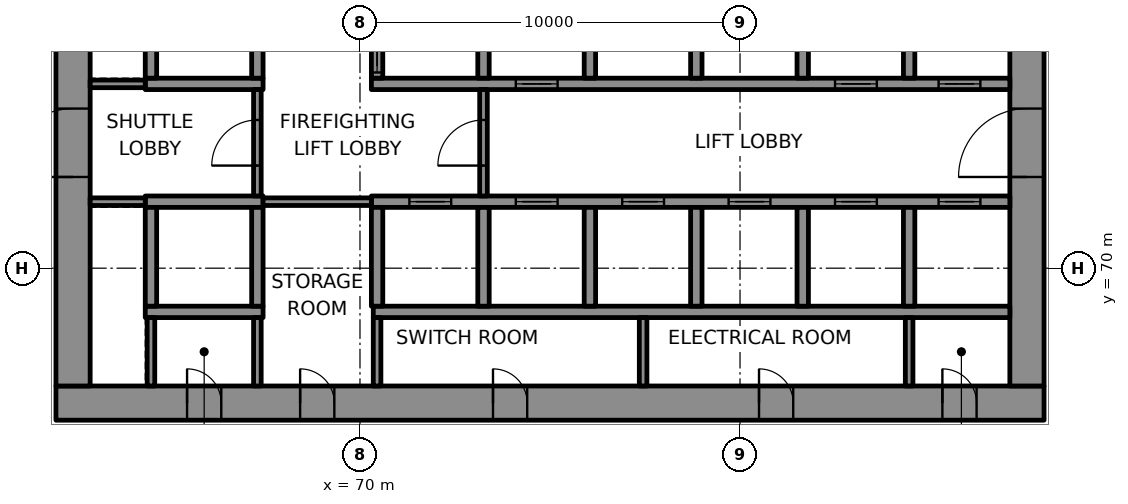
"""IFC4 building model, lengths in metres.
Left out: names, types, materials, properties, quantities, classifications, styles, units other than length and angle.
Written with IfcOpenShell. Run it as: python <this file> out.ifc"""

import sys

from ifc_helpers import new_model, si_unit, direction, frame, frame_2d, origin, place, context, subcontext, project, spatial, rectangle, extrude, element, fill, save


model = new_model("IFC4")
c1 = context("Model", 3, precision=1e-05, world=origin(), true_north=direction((0.0, 1.0)))
c2 = subcontext(c1, "Body", "Model", "MODEL_VIEW")
j1 = project(units=[si_unit("LENGTHUNIT", "METRE"), si_unit("PLANEANGLEUNIT", "RADIAN")], contexts=[c1])
p1 = place(None, origin())
s1 = spatial("IfcSite", under=j1, at=p1, CompositionType="ELEMENT")
p2 = place(p1, origin())
s2 = spatial("IfcBuilding", under=s1, at=p2, CompositionType="ELEMENT")
p3 = place(p2, frame((0.0, 0.0, 61.0)))
s3 = spatial("IfcBuildingStorey", under=s2, at=p3, CompositionType="ELEMENT", Elevation=61.0)
p4 = place(p3, frame((62.0, 66.45, 0.0), z_axis=(0.0, 0.0, 1.0), x_axis=(1.0, 0.0, 0.0)))
e1 = element("IfcWall", 1, at=p4, inside=s3, PredefinedType="SHEAR", context=c2, shape_type="SweptSolid", body=[
    extrude(rectangle(XDim=26.0, YDim=0.9, at=frame_2d((13.0, 0.0))), origin(), (0.0, 0.0, 1.0), 4.0),
])
p5 = place(p4, frame((3.45, 0.0, 0.0)))
e2 = element("IfcOpeningElement", 2, at=p5, cuts=e1, PredefinedType="OPENING", context=c2, shape_type="SweptSolid", body=[
    extrude(rectangle(XDim=0.9, YDim=2.1, at=frame_2d((0.45, 1.05))), frame((0.0, 0.46, 0.0), z_axis=(0.0, -1.0, 0.0), x_axis=(1.0, 0.0, 0.0)), (0.0, 0.0, 1.0), 0.92),
])
p6 = place(p4, frame((6.425, 0.0, 0.0)))
e3 = element("IfcOpeningElement", 3, at=p6, cuts=e1, PredefinedType="OPENING", context=c2, shape_type="SweptSolid", body=[
    extrude(rectangle(XDim=0.9, YDim=2.1, at=frame_2d((0.45, 1.05))), frame((0.0, 0.46, 0.0), z_axis=(0.0, -1.0, 0.0), x_axis=(1.0, 0.0, 0.0)), (0.0, 0.0, 1.0), 0.92),
])
p7 = place(p4, frame((11.5, 0.0, 0.0)))
e4 = element("IfcOpeningElement", 4, at=p7, cuts=e1, PredefinedType="OPENING", context=c2, shape_type="SweptSolid", body=[
    extrude(rectangle(XDim=0.9, YDim=2.1, at=frame_2d((0.45, 1.05))), frame((0.0, 0.46, 0.0), z_axis=(0.0, -1.0, 0.0), x_axis=(1.0, 0.0, 0.0)), (0.0, 0.0, 1.0), 0.92),
])
p8 = place(p4, frame((18.5, 0.0, 0.0)))
e5 = element("IfcOpeningElement", 5, at=p8, cuts=e1, PredefinedType="OPENING", context=c2, shape_type="SweptSolid", body=[
    extrude(rectangle(XDim=0.9, YDim=2.1, at=frame_2d((0.45, 1.05))), frame((0.0, 0.46, 0.0), z_axis=(0.0, -1.0, 0.0), x_axis=(1.0, 0.0, 0.0)), (0.0, 0.0, 1.0), 0.92),
])
p9 = place(p4, frame((23.325, 0.0, 0.0)))
e6 = element("IfcOpeningElement", 6, at=p9, cuts=e1, PredefinedType="OPENING", context=c2, shape_type="SweptSolid", body=[
    extrude(rectangle(XDim=0.9, YDim=2.1, at=frame_2d((0.45, 1.05))), frame((0.0, 0.46, 0.0), z_axis=(0.0, -1.0, 0.0), x_axis=(1.0, 0.0, 0.0)), (0.0, 0.0, 1.0), 0.92),
])
p10 = place(p3, frame((62.45, 66.9, 0.0), z_axis=(0.0, 0.0, 1.0), x_axis=(0.0, 1.0, 0.0)))
e7 = element("IfcWall", 7, at=p10, inside=s3, PredefinedType="SHEAR", context=c2, shape_type="SweptSolid", body=[
    extrude(rectangle(XDim=16.2, YDim=0.9, at=frame_2d((8.1, 0.0))), origin(), (0.0, 0.0, 1.0), 4.0),
])
p11 = place(p10, frame((5.5, 0.0, 0.0)))
e8 = element("IfcOpeningElement", 8, at=p11, cuts=e7, PredefinedType="OPENING", context=c2, shape_type="SweptSolid", body=[
    extrude(rectangle(XDim=1.8, YDim=2.1, at=frame_2d((0.9, 1.05))), frame((0.0, 0.46, 0.0), z_axis=(0.0, -1.0, 0.0), x_axis=(1.0, 0.0, 0.0)), (0.0, 0.0, 1.0), 0.92),
])
p12 = place(p3, frame((87.55, 66.9, 0.0), z_axis=(0.0, 0.0, 1.0), x_axis=(0.0, 1.0, 0.0)))
e9 = element("IfcWall", 9, at=p12, inside=s3, PredefinedType="SHEAR", context=c2, shape_type="SweptSolid", body=[
    extrude(rectangle(XDim=16.2, YDim=0.9, at=frame_2d((8.1, 0.0))), origin(), (0.0, 0.0, 1.0), 4.0),
])
p13 = place(p12, frame((5.5, 0.0, 0.0)))
e10 = element("IfcOpeningElement", 10, at=p13, cuts=e9, PredefinedType="OPENING", context=c2, shape_type="SweptSolid", body=[
    extrude(rectangle(XDim=1.8, YDim=2.1, at=frame_2d((0.9, 1.05))), frame((0.0, 0.46, 0.0), z_axis=(0.0, -1.0, 0.0), x_axis=(1.0, 0.0, 0.0)), (0.0, 0.0, 1.0), 0.92),
])
p14 = place(p12, frame((12.272, 0.0, 0.0)))
e11 = element("IfcOpeningElement", 11, at=p14, cuts=e9, PredefinedType="OPENING", context=c2, shape_type="SweptSolid", body=[
    extrude(rectangle(XDim=0.9, YDim=2.1, at=frame_2d((0.45, 1.05))), frame((0.0, 0.46, 0.0), z_axis=(0.0, -1.0, 0.0), x_axis=(1.0, 0.0, 0.0)), (0.0, 0.0, 1.0), 0.92),
])
p15 = place(p3, frame((64.35, 68.85, 0.0), z_axis=(0.0, 0.0, 1.0), x_axis=(1.0, 0.0, 0.0)))
e12 = element("IfcWall", 12, at=p15, inside=s3, PredefinedType="SHEAR", context=c2, shape_type="SweptSolid", body=[
    extrude(rectangle(XDim=3.1, YDim=0.3, at=frame_2d((1.55, 0.0))), origin(), (0.0, 0.0, 1.0), 4.0),
])
p16 = place(p3, frame((70.35, 68.85, 0.0), z_axis=(0.0, 0.0, 1.0), x_axis=(1.0, 0.0, 0.0)))
e13 = element("IfcWall", 13, at=p16, inside=s3, PredefinedType="SHEAR", context=c2, shape_type="SweptSolid", body=[
    extrude(rectangle(XDim=16.75, YDim=0.3, at=frame_2d((8.375, 0.0))), origin(), (0.0, 0.0, 1.0), 4.0),
])
p17 = place(p3, frame((64.35, 71.75, 0.0), z_axis=(0.0, 0.0, 1.0), x_axis=(1.0, 0.0, 0.0)))
e14 = element("IfcWall", 14, at=p17, inside=s3, PredefinedType="SHEAR", context=c2, shape_type="SweptSolid", body=[
    extrude(rectangle(XDim=3.1, YDim=0.3, at=frame_2d((1.55, 0.0))), origin(), (0.0, 0.0, 1.0), 4.0),
])
p18 = place(p3, frame((70.3, 71.75, 0.0), z_axis=(0.0, 0.0, 1.0), x_axis=(1.0, 0.0, 0.0)))
e15 = element("IfcWall", 15, at=p18, inside=s3, PredefinedType="SHEAR", context=c2, shape_type="SweptSolid", body=[
    extrude(rectangle(XDim=16.8, YDim=0.3, at=frame_2d((8.4, 0.0))), origin(), (0.0, 0.0, 1.0), 4.0),
])
p19 = place(p18, frame((1.0, 0.0, 0.0)))
e16 = element("IfcOpeningElement", 16, at=p19, cuts=e15, PredefinedType="OPENING", context=c2, shape_type="SweptSolid", body=[
    extrude(rectangle(XDim=1.1, YDim=2.1, at=frame_2d((0.55, 1.05))), frame((0.0, 0.16, 0.0), z_axis=(0.0, -1.0, 0.0), x_axis=(1.0, 0.0, 0.0)), (0.0, 0.0, 1.0), 0.32),
])
p20 = place(p18, frame((3.8, 0.0, 0.0)))
e17 = element("IfcOpeningElement", 17, at=p20, cuts=e15, PredefinedType="OPENING", context=c2, shape_type="SweptSolid", body=[
    extrude(rectangle(XDim=1.1, YDim=2.1, at=frame_2d((0.55, 1.05))), frame((0.0, 0.16, 0.0), z_axis=(0.0, -1.0, 0.0), x_axis=(1.0, 0.0, 0.0)), (0.0, 0.0, 1.0), 0.32),
])
p21 = place(p18, frame((6.6, 0.0, 0.0)))
e18 = element("IfcOpeningElement", 18, at=p21, cuts=e15, PredefinedType="OPENING", context=c2, shape_type="SweptSolid", body=[
    extrude(rectangle(XDim=1.1, YDim=2.1, at=frame_2d((0.55, 1.05))), frame((0.0, 0.16, 0.0), z_axis=(0.0, -1.0, 0.0), x_axis=(1.0, 0.0, 0.0)), (0.0, 0.0, 1.0), 0.32),
])
p22 = place(p18, frame((9.4, 0.0, 0.0)))
e19 = element("IfcOpeningElement", 19, at=p22, cuts=e15, PredefinedType="OPENING", context=c2, shape_type="SweptSolid", body=[
    extrude(rectangle(XDim=1.1, YDim=2.1, at=frame_2d((0.55, 1.05))), frame((0.0, 0.16, 0.0), z_axis=(0.0, -1.0, 0.0), x_axis=(1.0, 0.0, 0.0)), (0.0, 0.0, 1.0), 0.32),
])
p23 = place(p18, frame((12.2, 0.0, 0.0)))
e20 = element("IfcOpeningElement", 20, at=p23, cuts=e15, PredefinedType="OPENING", context=c2, shape_type="SweptSolid", body=[
    extrude(rectangle(XDim=1.1, YDim=2.1, at=frame_2d((0.55, 1.05))), frame((0.0, 0.16, 0.0), z_axis=(0.0, -1.0, 0.0), x_axis=(1.0, 0.0, 0.0)), (0.0, 0.0, 1.0), 0.32),
])
p24 = place(p18, frame((14.925, 0.0, 0.0)))
e21 = element("IfcOpeningElement", 21, at=p24, cuts=e15, PredefinedType="OPENING", context=c2, shape_type="SweptSolid", body=[
    extrude(rectangle(XDim=1.1, YDim=2.1, at=frame_2d((0.55, 1.05))), frame((0.0, 0.16, 0.0), z_axis=(0.0, -1.0, 0.0), x_axis=(1.0, 0.0, 0.0)), (0.0, 0.0, 1.0), 0.32),
])
p25 = place(p3, frame((64.35, 74.85, 0.0), z_axis=(0.0, 0.0, 1.0), x_axis=(1.0, 0.0, 0.0)))
e22 = element("IfcWall", 22, at=p25, inside=s3, PredefinedType="SHEAR", context=c2, shape_type="SweptSolid", body=[
    extrude(rectangle(XDim=3.1, YDim=0.3, at=frame_2d((1.55, 0.0))), origin(), (0.0, 0.0, 1.0), 4.0),
])
p26 = place(p3, frame((70.3, 74.85, 0.0), z_axis=(0.0, 0.0, 1.0), x_axis=(1.0, 0.0, 0.0)))
e23 = element("IfcWall", 23, at=p26, inside=s3, PredefinedType="SHEAR", context=c2, shape_type="SweptSolid", body=[
    extrude(rectangle(XDim=16.8, YDim=0.3, at=frame_2d((8.4, 0.0))), origin(), (0.0, 0.0, 1.0), 4.0),
])
p27 = place(p26, frame((3.8, 0.0, 0.0)))
e24 = element("IfcOpeningElement", 24, at=p27, cuts=e23, PredefinedType="OPENING", context=c2, shape_type="SweptSolid", body=[
    extrude(rectangle(XDim=1.1, YDim=2.1, at=frame_2d((0.55, 1.05))), frame((0.0, 0.16, 0.0), z_axis=(0.0, -1.0, 0.0), x_axis=(1.0, 0.0, 0.0)), (0.0, 0.0, 1.0), 0.32),
])
p28 = place(p26, frame((12.2, 0.0, 0.0)))
e25 = element("IfcOpeningElement", 25, at=p28, cuts=e23, PredefinedType="OPENING", context=c2, shape_type="SweptSolid", body=[
    extrude(rectangle(XDim=1.1, YDim=2.1, at=frame_2d((0.55, 1.05))), frame((0.0, 0.16, 0.0), z_axis=(0.0, -1.0, 0.0), x_axis=(1.0, 0.0, 0.0)), (0.0, 0.0, 1.0), 0.32),
])
p29 = place(p26, frame((14.925, 0.0, 0.0)))
e26 = element("IfcOpeningElement", 26, at=p29, cuts=e23, PredefinedType="OPENING", context=c2, shape_type="SweptSolid", body=[
    extrude(rectangle(XDim=1.1, YDim=2.1, at=frame_2d((0.55, 1.05))), frame((0.0, 0.16, 0.0), z_axis=(0.0, -1.0, 0.0), x_axis=(1.0, 0.0, 0.0)), (0.0, 0.0, 1.0), 0.32),
])
for number, where, z_axis, x_axis in (
    (27, (64.5, 69.0, 0.0), (0.0, 0.0, 1.0), (0.0, 1.0, 0.0)),
    (28, (64.5, 75.0, 0.0), (0.0, 0.0, 1.0), (0.0, 1.0, 0.0)),
    (29, (67.3, 69.0, 0.0), (0.0, 0.0, 1.0), (0.0, 1.0, 0.0)),
    (30, (67.3, 75.0, 0.0), (0.0, 0.0, 1.0), (0.0, 1.0, 0.0)),
    (31, (70.45, 69.0, 0.0), (0.0, 0.0, 1.0), (0.0, 1.0, 0.0)),
):
    element("IfcWall", number, at=place(p3, frame(where, z_axis=z_axis, x_axis=x_axis)), inside=s3, PredefinedType="SHEAR", context=c2, shape_type="SweptSolid", body=[
        extrude(rectangle(XDim=2.6, YDim=0.3, at=frame_2d((1.3, 0.0))), origin(), (0.0, 0.0, 1.0), 4.0),
    ])
p30 = place(p3, frame((70.45, 75.0, 0.0), z_axis=(0.0, 0.0, 1.0), x_axis=(0.0, 1.0, 0.0)))
e32 = element("IfcWall", 32, at=p30, inside=s3, PredefinedType="SHEAR", context=c2, shape_type="SweptSolid", body=[
    extrude(rectangle(XDim=2.6, YDim=0.3, at=frame_2d((1.3, 0.0))), origin(), (0.0, 0.0, 1.0), 4.0),
])
p31 = place(p30, frame((0.15, 0.0, 0.0)))
e33 = element("IfcOpeningElement", 33, at=p31, cuts=e32, PredefinedType="OPENING", context=c2, shape_type="SweptSolid", body=[
    extrude(rectangle(XDim=1.1, YDim=2.1, at=frame_2d((0.55, 1.05))), frame((0.0, 0.16, 0.0), z_axis=(0.0, -1.0, 0.0), x_axis=(1.0, 0.0, 0.0)), (0.0, 0.0, 1.0), 0.32),
])
for number, where, z_axis, x_axis in (
    (34, (73.25, 69.0, 0.0), (0.0, 0.0, 1.0), (0.0, 1.0, 0.0)),
    (35, (73.25, 75.0, 0.0), (0.0, 0.0, 1.0), (0.0, 1.0, 0.0)),
    (36, (76.05, 69.0, 0.0), (0.0, 0.0, 1.0), (0.0, 1.0, 0.0)),
    (37, (76.05, 75.0, 0.0), (0.0, 0.0, 1.0), (0.0, 1.0, 0.0)),
    (38, (78.85, 69.0, 0.0), (0.0, 0.0, 1.0), (0.0, 1.0, 0.0)),
    (39, (78.85, 75.0, 0.0), (0.0, 0.0, 1.0), (0.0, 1.0, 0.0)),
    (40, (81.65, 69.0, 0.0), (0.0, 0.0, 1.0), (0.0, 1.0, 0.0)),
    (41, (81.65, 75.0, 0.0), (0.0, 0.0, 1.0), (0.0, 1.0, 0.0)),
    (42, (84.45, 69.0, 0.0), (0.0, 0.0, 1.0), (0.0, 1.0, 0.0)),
    (43, (84.45, 75.0, 0.0), (0.0, 0.0, 1.0), (0.0, 1.0, 0.0)),
):
    element("IfcWall", number, at=place(p3, frame(where, z_axis=z_axis, x_axis=x_axis)), inside=s3, PredefinedType="SHEAR", context=c2, shape_type="SweptSolid", body=[
        extrude(rectangle(XDim=2.6, YDim=0.3, at=frame_2d((1.3, 0.0))), origin(), (0.0, 0.0, 1.0), 4.0),
    ])
p32 = place(p3, frame((62.9, 71.75, 0.0), z_axis=(0.0, 0.0, 1.0), x_axis=(1.0, 0.0, 0.0)))
e44 = element("IfcWall", 44, at=p32, inside=s3, PredefinedType="PARTITIONING", context=c2, shape_type="SweptSolid", body=[
    extrude(rectangle(XDim=1.45, YDim=0.2, at=frame_2d((0.725, 0.0))), origin(), (0.0, 0.0, 1.0), 4.0),
])
p33 = place(p3, frame((67.45, 71.75, 0.0), z_axis=(0.0, 0.0, 1.0), x_axis=(1.0, 0.0, 0.0)))
e45 = element("IfcWall", 45, at=p33, inside=s3, PredefinedType="PARTITIONING", context=c2, shape_type="SweptSolid", body=[
    extrude(rectangle(XDim=2.85, YDim=0.2, at=frame_2d((1.425, 0.0))), origin(), (0.0, 0.0, 1.0), 4.0),
])
p34 = place(p3, frame((62.9, 74.85, 0.0), z_axis=(0.0, 0.0, 1.0), x_axis=(1.0, 0.0, 0.0)))
e46 = element("IfcWall", 46, at=p34, inside=s3, PredefinedType="PARTITIONING", context=c2, shape_type="SweptSolid", body=[
    extrude(rectangle(XDim=1.45, YDim=0.2, at=frame_2d((0.725, 0.0))), origin(), (0.0, 0.0, 1.0), 4.0),
])
for number, where, z_axis, x_axis in (
    (47, (64.5, 66.9, 0.0), (0.0, 0.0, 1.0), (0.0, 1.0, 0.0)),
    (48, (67.3, 66.9, 0.0), (0.0, 0.0, 1.0), (0.0, 1.0, 0.0)),
):
    element("IfcWall", number, at=place(p3, frame(where, z_axis=z_axis, x_axis=x_axis)), inside=s3, PredefinedType="PARTITIONING", context=c2, shape_type="SweptSolid", body=[
        extrude(rectangle(XDim=1.8, YDim=0.2, at=frame_2d((0.9, 0.0))), origin(), (0.0, 0.0, 1.0), 4.0),
    ])
p35 = place(p3, frame((67.3, 71.9, 0.0), z_axis=(0.0, 0.0, 1.0), x_axis=(0.0, 1.0, 0.0)))
e49 = element("IfcWall", 49, at=p35, inside=s3, PredefinedType="PARTITIONING", context=c2, shape_type="SweptSolid", body=[
    extrude(rectangle(XDim=2.8, YDim=0.2, at=frame_2d((1.4, 0.0))), origin(), (0.0, 0.0, 1.0), 4.0),
])
p36 = place(p35, frame((0.8, 0.0, 0.0)))
e50 = element("IfcOpeningElement", 50, at=p36, cuts=e49, PredefinedType="OPENING", context=c2, shape_type="SweptSolid", body=[
    extrude(rectangle(XDim=1.2, YDim=2.1, at=frame_2d((0.6, 1.05))), frame((0.0, 0.11, 0.0), z_axis=(0.0, -1.0, 0.0), x_axis=(1.0, 0.0, 0.0)), (0.0, 0.0, 1.0), 0.22),
])
p37 = place(p3, frame((70.45, 66.9, 0.0), z_axis=(0.0, 0.0, 1.0), x_axis=(0.0, 1.0, 0.0)))
e51 = element("IfcWall", 51, at=p37, inside=s3, PredefinedType="PARTITIONING", context=c2, shape_type="SweptSolid", body=[
    extrude(rectangle(XDim=1.8, YDim=0.2, at=frame_2d((0.9, 0.0))), origin(), (0.0, 0.0, 1.0), 4.0),
])
p38 = place(p3, frame((73.25, 71.9, 0.0), z_axis=(0.0, 0.0, 1.0), x_axis=(0.0, 1.0, 0.0)))
e52 = element("IfcWall", 52, at=p38, inside=s3, PredefinedType="PARTITIONING", context=c2, shape_type="SweptSolid", body=[
    extrude(rectangle(XDim=2.8, YDim=0.2, at=frame_2d((1.4, 0.0))), origin(), (0.0, 0.0, 1.0), 4.0),
])
p39 = place(p38, frame((0.8, 0.0, 0.0)))
e53 = element("IfcOpeningElement", 53, at=p39, cuts=e52, PredefinedType="OPENING", context=c2, shape_type="SweptSolid", body=[
    extrude(rectangle(XDim=1.2, YDim=2.1, at=frame_2d((0.6, 1.05))), frame((0.0, 0.11, 0.0), z_axis=(0.0, -1.0, 0.0), x_axis=(1.0, 0.0, 0.0)), (0.0, 0.0, 1.0), 0.22),
])
for number, where, z_axis, x_axis in (
    (54, (77.45, 66.9, 0.0), (0.0, 0.0, 1.0), (0.0, 1.0, 0.0)),
    (55, (84.45, 66.9, 0.0), (0.0, 0.0, 1.0), (0.0, 1.0, 0.0)),
):
    element("IfcWall", number, at=place(p3, frame(where, z_axis=z_axis, x_axis=x_axis)), inside=s3, PredefinedType="PARTITIONING", context=c2, shape_type="SweptSolid", body=[
        extrude(rectangle(XDim=1.8, YDim=0.2, at=frame_2d((0.9, 0.0))), origin(), (0.0, 0.0, 1.0), 4.0),
    ])
p40 = place(p19, origin())
e56 = element("IfcDoor", 56, at=p40, inside=s3, OperationType="DOUBLE_DOOR_SLIDING", PredefinedType="DOOR", context=c2, shape_type="SweptSolid", body=[
    extrude(rectangle(XDim=1.1, YDim=2.1, at=frame_2d((0.55, 1.05))), frame((0.0, 0.025, 0.0), z_axis=(0.0, -1.0, 0.0), x_axis=(1.0, 0.0, 0.0)), (0.0, 0.0, 1.0), 0.05),
])
fill(e16, e56)
p41 = place(p20, origin())
e57 = element("IfcDoor", 57, at=p41, inside=s3, OperationType="DOUBLE_DOOR_SLIDING", PredefinedType="DOOR", context=c2, shape_type="SweptSolid", body=[
    extrude(rectangle(XDim=1.1, YDim=2.1, at=frame_2d((0.55, 1.05))), frame((0.0, 0.025, 0.0), z_axis=(0.0, -1.0, 0.0), x_axis=(1.0, 0.0, 0.0)), (0.0, 0.0, 1.0), 0.05),
])
fill(e17, e57)
p42 = place(p21, origin())
e58 = element("IfcDoor", 58, at=p42, inside=s3, OperationType="DOUBLE_DOOR_SLIDING", PredefinedType="DOOR", context=c2, shape_type="SweptSolid", body=[
    extrude(rectangle(XDim=1.1, YDim=2.1, at=frame_2d((0.55, 1.05))), frame((0.0, 0.025, 0.0), z_axis=(0.0, -1.0, 0.0), x_axis=(1.0, 0.0, 0.0)), (0.0, 0.0, 1.0), 0.05),
])
fill(e18, e58)
p43 = place(p22, origin())
e59 = element("IfcDoor", 59, at=p43, inside=s3, OperationType="DOUBLE_DOOR_SLIDING", PredefinedType="DOOR", context=c2, shape_type="SweptSolid", body=[
    extrude(rectangle(XDim=1.1, YDim=2.1, at=frame_2d((0.55, 1.05))), frame((0.0, 0.025, 0.0), z_axis=(0.0, -1.0, 0.0), x_axis=(1.0, 0.0, 0.0)), (0.0, 0.0, 1.0), 0.05),
])
fill(e19, e59)
p44 = place(p23, origin())
e60 = element("IfcDoor", 60, at=p44, inside=s3, OperationType="DOUBLE_DOOR_SLIDING", PredefinedType="DOOR", context=c2, shape_type="SweptSolid", body=[
    extrude(rectangle(XDim=1.1, YDim=2.1, at=frame_2d((0.55, 1.05))), frame((0.0, 0.025, 0.0), z_axis=(0.0, -1.0, 0.0), x_axis=(1.0, 0.0, 0.0)), (0.0, 0.0, 1.0), 0.05),
])
fill(e20, e60)
p45 = place(p24, origin())
e61 = element("IfcDoor", 61, at=p45, inside=s3, OperationType="DOUBLE_DOOR_SLIDING", PredefinedType="DOOR", context=c2, shape_type="SweptSolid", body=[
    extrude(rectangle(XDim=1.1, YDim=2.1, at=frame_2d((0.55, 1.05))), frame((0.0, 0.025, 0.0), z_axis=(0.0, -1.0, 0.0), x_axis=(1.0, 0.0, 0.0)), (0.0, 0.0, 1.0), 0.05),
])
fill(e21, e61)
p46 = place(p31, origin())
e62 = element("IfcDoor", 62, at=p46, inside=s3, OperationType="DOUBLE_DOOR_SLIDING", PredefinedType="DOOR", context=c2, shape_type="SweptSolid", body=[
    extrude(rectangle(XDim=1.1, YDim=2.1, at=frame_2d((0.55, 1.05))), frame((0.0, 0.025, 0.0), z_axis=(0.0, -1.0, 0.0), x_axis=(1.0, 0.0, 0.0)), (0.0, 0.0, 1.0), 0.05),
])
fill(e33, e62)
p47 = place(p27, origin())
e63 = element("IfcDoor", 63, at=p47, inside=s3, OperationType="DOUBLE_DOOR_SLIDING", PredefinedType="DOOR", context=c2, shape_type="SweptSolid", body=[
    extrude(rectangle(XDim=1.1, YDim=2.1, at=frame_2d((0.55, 1.05))), frame((0.0, 0.025, 0.0), z_axis=(0.0, -1.0, 0.0), x_axis=(1.0, 0.0, 0.0)), (0.0, 0.0, 1.0), 0.05),
])
fill(e24, e63)
p48 = place(p28, origin())
e64 = element("IfcDoor", 64, at=p48, inside=s3, OperationType="DOUBLE_DOOR_SLIDING", PredefinedType="DOOR", context=c2, shape_type="SweptSolid", body=[
    extrude(rectangle(XDim=1.1, YDim=2.1, at=frame_2d((0.55, 1.05))), frame((0.0, 0.025, 0.0), z_axis=(0.0, -1.0, 0.0), x_axis=(1.0, 0.0, 0.0)), (0.0, 0.0, 1.0), 0.05),
])
fill(e25, e64)
p49 = place(p29, origin())
e65 = element("IfcDoor", 65, at=p49, inside=s3, OperationType="DOUBLE_DOOR_SLIDING", PredefinedType="DOOR", context=c2, shape_type="SweptSolid", body=[
    extrude(rectangle(XDim=1.1, YDim=2.1, at=frame_2d((0.55, 1.05))), frame((0.0, 0.025, 0.0), z_axis=(0.0, -1.0, 0.0), x_axis=(1.0, 0.0, 0.0)), (0.0, 0.0, 1.0), 0.05),
])
fill(e26, e65)
p50 = place(p39, origin())
e66 = element("IfcDoor", 66, at=p50, inside=s3, OperationType="SINGLE_SWING_LEFT", PredefinedType="DOOR", context=c2, shape_type="SweptSolid", body=[
    extrude(rectangle(XDim=1.2, YDim=2.1, at=frame_2d((0.6, 1.05))), frame((0.0, 0.025, 0.0), z_axis=(0.0, -1.0, 0.0), x_axis=(1.0, 0.0, 0.0)), (0.0, 0.0, 1.0), 0.05),
])
fill(e53, e66)
p51 = place(p36, origin())
e67 = element("IfcDoor", 67, at=p51, inside=s3, OperationType="SINGLE_SWING_RIGHT", PredefinedType="DOOR", context=c2, shape_type="SweptSolid", body=[
    extrude(rectangle(XDim=1.2, YDim=2.1, at=frame_2d((0.6, 1.05))), frame((0.0, 0.025, 0.0), z_axis=(0.0, -1.0, 0.0), x_axis=(1.0, 0.0, 0.0)), (0.0, 0.0, 1.0), 0.05),
])
fill(e50, e67)
p52 = place(p11, origin())
e68 = element("IfcDoor", 68, at=p52, inside=s3, OperationType="SINGLE_SWING_LEFT", PredefinedType="DOOR", context=c2, shape_type="SweptSolid", body=[
    extrude(rectangle(XDim=1.8, YDim=2.1, at=frame_2d((0.9, 1.05))), frame((0.0, 0.17, 0.0), z_axis=(0.0, -1.0, 0.0), x_axis=(1.0, 0.0, 0.0)), (0.0, 0.0, 1.0), 0.34),
])
fill(e8, e68)
p53 = place(p13, origin())
e69 = element("IfcDoor", 69, at=p53, inside=s3, OperationType="SINGLE_SWING_RIGHT", PredefinedType="DOOR", context=c2, shape_type="SweptSolid", body=[
    extrude(rectangle(XDim=1.8, YDim=2.1, at=frame_2d((0.9, 1.05))), frame((0.0, 0.17, 0.0), z_axis=(0.0, -1.0, 0.0), x_axis=(1.0, 0.0, 0.0)), (0.0, 0.0, 1.0), 0.34),
])
fill(e10, e69)
p54 = place(p5, origin())
e70 = element("IfcDoor", 70, at=p54, inside=s3, OperationType="SINGLE_SWING_LEFT", PredefinedType="DOOR", context=c2, shape_type="SweptSolid", body=[
    extrude(rectangle(XDim=0.9, YDim=2.1, at=frame_2d((0.45, 1.05))), frame((0.0, 0.17, 0.0), z_axis=(0.0, -1.0, 0.0), x_axis=(1.0, 0.0, 0.0)), (0.0, 0.0, 1.0), 0.34),
])
fill(e2, e70)
p55 = place(p6, origin())
e71 = element("IfcDoor", 71, at=p55, inside=s3, OperationType="SINGLE_SWING_RIGHT", PredefinedType="DOOR", context=c2, shape_type="SweptSolid", body=[
    extrude(rectangle(XDim=0.9, YDim=2.1, at=frame_2d((0.45, 1.05))), frame((0.0, 0.17, 0.0), z_axis=(0.0, -1.0, 0.0), x_axis=(1.0, 0.0, 0.0)), (0.0, 0.0, 1.0), 0.34),
])
fill(e3, e71)
p56 = place(p7, origin())
e72 = element("IfcDoor", 72, at=p56, inside=s3, OperationType="SINGLE_SWING_LEFT", PredefinedType="DOOR", context=c2, shape_type="SweptSolid", body=[
    extrude(rectangle(XDim=0.9, YDim=2.1, at=frame_2d((0.45, 1.05))), frame((0.0, 0.17, 0.0), z_axis=(0.0, -1.0, 0.0), x_axis=(1.0, 0.0, 0.0)), (0.0, 0.0, 1.0), 0.34),
])
fill(e4, e72)
p57 = place(p8, origin())
e73 = element("IfcDoor", 73, at=p57, inside=s3, OperationType="SINGLE_SWING_RIGHT", PredefinedType="DOOR", context=c2, shape_type="SweptSolid", body=[
    extrude(rectangle(XDim=0.9, YDim=2.1, at=frame_2d((0.45, 1.05))), frame((0.0, 0.17, 0.0), z_axis=(0.0, -1.0, 0.0), x_axis=(1.0, 0.0, 0.0)), (0.0, 0.0, 1.0), 0.34),
])
fill(e5, e73)
p58 = place(p9, origin())
e74 = element("IfcDoor", 74, at=p58, inside=s3, OperationType="SINGLE_SWING_LEFT", PredefinedType="DOOR", context=c2, shape_type="SweptSolid", body=[
    extrude(rectangle(XDim=0.9, YDim=2.1, at=frame_2d((0.45, 1.05))), frame((0.0, 0.17, 0.0), z_axis=(0.0, -1.0, 0.0), x_axis=(1.0, 0.0, 0.0)), (0.0, 0.0, 1.0), 0.34),
])
fill(e6, e74)
save(model, sys.argv[1])
